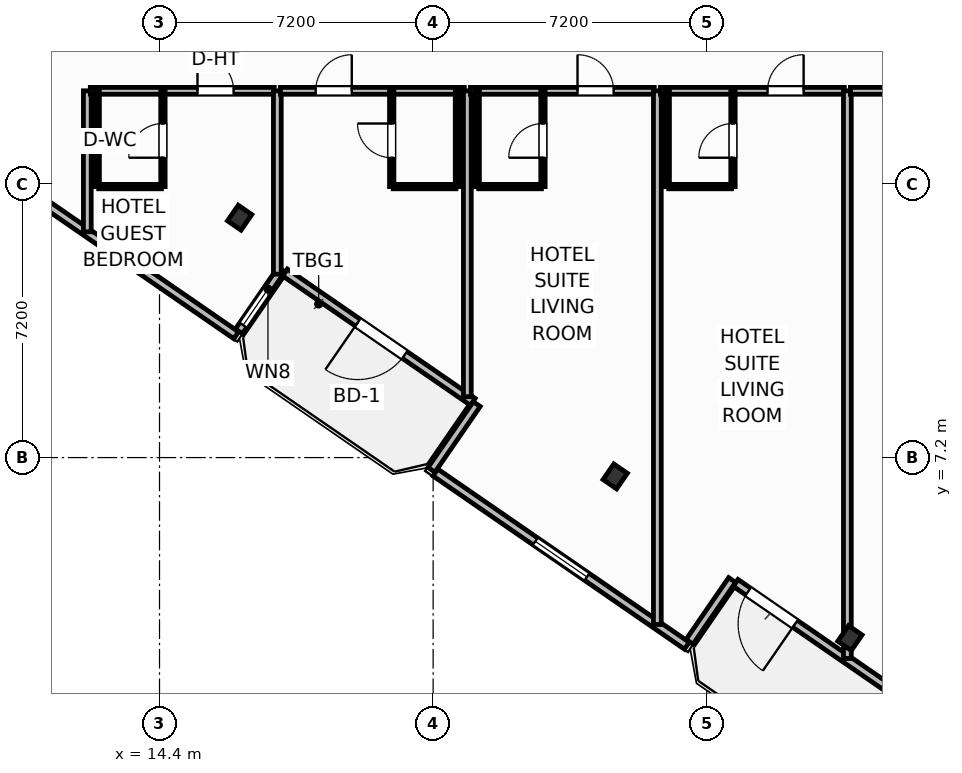
"""IFC4 building model, lengths in metres.
Left out: names, types, materials, properties, quantities, classifications, styles, units other than length and angle.
Written with IfcOpenShell. Run it as: python <this file> out.ifc"""

import sys

from ifc_helpers import new_model, si_unit, direction, frame, frame_2d, origin, origin_2d, place, context, subcontext, project, spatial, rectangle, i_section, extrude, element, fill, save


model = new_model("IFC4")
c1 = context("Model", 3, precision=1e-05, world=origin(), true_north=direction((0.0, 1.0)))
c2 = subcontext(c1, "Body", "Model", "MODEL_VIEW")
j1 = project(units=[si_unit("LENGTHUNIT", "METRE"), si_unit("PLANEANGLEUNIT", "RADIAN")], contexts=[c1])
p1 = place(None, origin())
s1 = spatial("IfcSite", under=j1, at=p1, CompositionType="ELEMENT")
p2 = place(p1, origin())
s2 = spatial("IfcBuilding", under=s1, at=p2, CompositionType="ELEMENT")
p3 = place(p2, frame((0.0, 0.0, 30.7)))
s3 = spatial("IfcBuildingStorey", under=s2, at=p3, CompositionType="ELEMENT", Elevation=30.7)
for number, where, z_axis, x_axis in (
    (1, (16.509, 13.512, 0.0), (0.0, 0.0, 1.0), (0.824, -0.567, 0.0)),
    (2, (26.391, 6.705, 0.0), (0.0, 0.0, 1.0), (0.824, -0.567, 0.0)),
    (3, (32.568, 2.45, 0.0), (0.0, 0.0, 1.0), (0.824, -0.567, 0.0)),
):
    element("IfcColumn", number, at=place(p3, frame(where, z_axis=z_axis, x_axis=x_axis)), inside=s3, PredefinedType="COLUMN", context=c2, shape_type="SweptSolid", body=[
        extrude(i_section(OverallWidth=0.432, OverallDepth=0.498, WebThickness=0.056, FlangeThickness=0.089, FilletRadius=0.025, at=origin_2d()), origin(), (0.0, 0.0, 1.0), 3.7),
    ])
p4 = place(p3, frame((22.643, 8.667, 0.0), z_axis=(0.0, 0.0, 1.0), x_axis=(-0.823534636215, 0.567265989598, 0.0)))
e4 = element("IfcWall", 4, at=p4, inside=s3, PredefinedType="SOLIDWALL", context=c2, shape_type="SweptSolid", body=[
    extrude(rectangle(XDim=6.0, YDim=0.22, at=frame_2d((3.0, 0.0))), origin(), (0.0, 0.0, 1.0), 2.73),
])
p5 = place(p4, frame((2.176, 0.0, 0.0)))
e5 = element("IfcOpeningElement", 5, at=p5, cuts=e4, PredefinedType="OPENING", context=c2, shape_type="SweptSolid", body=[
    extrude(rectangle(XDim=1.5, YDim=2.25, at=frame_2d((0.75, 1.125))), frame((0.0, 0.12, 0.0), z_axis=(0.0, -1.0, 0.0), x_axis=(1.0, 0.0, 0.0)), (0.0, 0.0, 1.0), 0.24),
])
p6 = place(p3, frame((34.502, 0.499, 0.0), z_axis=(0.0, 0.0, 1.0), x_axis=(-0.823534636215, 0.567265989598, 0.0)))
e6 = element("IfcWall", 6, at=p6, inside=s3, PredefinedType="SOLIDWALL", context=c2, shape_type="SweptSolid", body=[
    extrude(rectangle(XDim=6.0, YDim=0.22, at=frame_2d((3.0, 0.0))), origin(), (0.0, 0.0, 1.0), 2.73),
])
p7 = place(p6, frame((4.1, 0.0, 0.0)))
e7 = element("IfcOpeningElement", 7, at=p7, cuts=e6, PredefinedType="OPENING", context=c2, shape_type="SweptSolid", body=[
    extrude(rectangle(XDim=1.5, YDim=2.25, at=frame_2d((0.75, 1.125))), frame((0.0, 0.12, 0.0), z_axis=(0.0, -1.0, 0.0), x_axis=(1.0, 0.0, 0.0)), (0.0, 0.0, 1.0), 0.24),
])
p8 = place(p3, frame((-2.728, 23.605, 0.0), z_axis=(0.0, 0.0, 1.0), x_axis=(0.823535075462, -0.567265351915, 0.0)))
e8 = element("IfcWall", 8, at=p8, inside=s3, PredefinedType="SOLIDWALL", context=c2, shape_type="SweptSolid", body=[
    extrude(rectangle(XDim=23.247, YDim=0.22, at=frame_2d((11.624, 0.0))), origin(), (0.0, 0.0, 1.0), 2.73),
])
p9 = place(p8, frame((10.799, 0.0, 0.8)))
e9 = element("IfcOpeningElement", 9, at=p9, cuts=e8, PredefinedType="OPENING", context=c2, shape_type="SweptSolid", body=[
    extrude(rectangle(XDim=1.65, YDim=1.65, at=frame_2d((0.825, 0.825))), frame((0.0, 0.12, 0.0), z_axis=(0.0, -1.0, 0.0), x_axis=(1.0, 0.0, 0.0)), (0.0, 0.0, 1.0), 0.24),
])
p10 = place(p3, frame((16.488, 10.521, 0.0), z_axis=(0.0, 0.0, 1.0), x_axis=(0.567131976434, 0.823626930902, 0.0)))
e10 = element("IfcWall", 10, at=p10, inside=s3, PredefinedType="SOLIDWALL", context=c2, shape_type="SweptSolid", body=[
    extrude(rectangle(XDim=1.975, YDim=0.22, at=frame_2d((0.988, 0.0))), origin(), (0.0, 0.0, 1.0), 2.73),
])
p11 = place(p10, frame((0.2, 0.0, 0.8)))
e11 = element("IfcOpeningElement", 11, at=p11, cuts=e10, PredefinedType="OPENING", context=c2, shape_type="SweptSolid", body=[
    extrude(rectangle(XDim=1.15, YDim=1.4, at=frame_2d((0.575, 0.7))), frame((0.0, 0.12, 0.0), z_axis=(0.0, -1.0, 0.0), x_axis=(1.0, 0.0, 0.0)), (0.0, 0.0, 1.0), 0.24),
])
p12 = place(p3, frame((22.747, 8.607, 0.0), z_axis=(0.0, 0.0, 1.0), x_axis=(-0.567219383419, -0.823566737474, 0.0)))
e12 = element("IfcWall", 12, at=p12, inside=s3, PredefinedType="SOLIDWALL", context=c2, shape_type="SweptSolid", body=[
    extrude(rectangle(XDim=2.1, YDim=0.22, at=frame_2d((1.05, 0.0))), origin(), (0.0, 0.0, 1.0), 2.73),
])
p13 = place(p3, frame((21.659, 6.807, 0.0), z_axis=(0.0, 0.0, 1.0), x_axis=(0.823535360023, -0.567264938799, 0.0)))
e13 = element("IfcWall", 13, at=p13, inside=s3, PredefinedType="SOLIDWALL", context=c2, shape_type="SweptSolid", body=[
    extrude(rectangle(XDim=8.035, YDim=0.22, at=frame_2d((4.018, 0.0))), origin(), (0.0, 0.0, 1.0), 2.73),
])
p14 = place(p13, frame((3.192, 0.0, 0.8)))
e14 = element("IfcOpeningElement", 14, at=p14, cuts=e13, PredefinedType="OPENING", context=c2, shape_type="SweptSolid", body=[
    extrude(rectangle(XDim=1.65, YDim=1.65, at=frame_2d((0.825, 0.825))), frame((0.0, 0.12, 0.0), z_axis=(0.0, -1.0, 0.0), x_axis=(1.0, 0.0, 0.0)), (0.0, 0.0, 1.0), 0.24),
])
p15 = place(p3, frame((28.347, 2.352, 0.0), z_axis=(0.0, 0.0, 1.0), x_axis=(0.567215821234, 0.823569190865, 0.0)))
e15 = element("IfcWall", 15, at=p15, inside=s3, PredefinedType="SOLIDWALL", context=c2, shape_type="SweptSolid", body=[
    extrude(rectangle(XDim=1.975, YDim=0.22, at=frame_2d((0.988, 0.0))), origin(), (0.0, 0.0, 1.0), 2.73),
])
p16 = place(p3, frame((12.5, 13.14, 0.0), z_axis=(0.0, 0.0, 1.0), x_axis=(0.0, 1.0, 0.0)))
e16 = element("IfcWall", 16, at=p16, inside=s3, PredefinedType="PARTITIONING", context=c2, shape_type="SweptSolid", body=[
    extrude(rectangle(XDim=3.71, YDim=0.205, at=frame_2d((1.855, 0.0))), origin(), (0.0, 0.0, 1.0), 3.45),
])
p17 = place(p3, frame((12.58, 16.85, 0.0), z_axis=(0.0, 0.0, 1.0), x_axis=(1.0, 0.0, 0.0)))
e17 = element("IfcWall", 17, at=p17, inside=s3, PredefinedType="PARTITIONING", context=c2, shape_type="SweptSolid", body=[
    extrude(rectangle(XDim=4.84, YDim=0.18, at=frame_2d((2.42, 0.0))), origin(), (0.0, 0.0, 1.0), 3.45),
])
p18 = place(p17, frame((2.819, 0.0, 0.0)))
e18 = element("IfcOpeningElement", 18, at=p18, cuts=e17, PredefinedType="OPENING", context=c2, shape_type="SweptSolid", body=[
    extrude(rectangle(XDim=0.95, YDim=2.15, at=frame_2d((0.475, 1.075))), frame((0.0, 0.1, 0.0), z_axis=(0.0, -1.0, 0.0), x_axis=(1.0, 0.0, 0.0)), (0.0, 0.0, 1.0), 0.2),
])
p19 = place(p3, frame((12.8, 14.33, 0.0), z_axis=(0.0, 0.0, 1.0), x_axis=(1.0, 0.0, 0.0)))
e19 = element("IfcWall", 19, at=p19, inside=s3, PredefinedType="PARTITIONING", context=c2, shape_type="SweptSolid", body=[
    extrude(rectangle(XDim=1.65, YDim=0.115, at=frame_2d((0.825, 0.0))), origin(), (0.0, 0.0, 1.0), 3.45),
])
p20 = place(p3, frame((14.49, 14.33, 0.0), z_axis=(0.0, 0.0, 1.0), x_axis=(0.0, 1.0, 0.0)))
e20 = element("IfcWall", 20, at=p20, inside=s3, PredefinedType="PARTITIONING", context=c2, shape_type="SweptSolid", body=[
    extrude(rectangle(XDim=2.52, YDim=0.115, at=frame_2d((1.26, 0.0))), origin(), (0.0, 0.0, 1.0), 3.45),
])
p21 = place(p20, frame((0.76, 0.0, 0.0)))
e21 = element("IfcOpeningElement", 21, at=p21, cuts=e20, PredefinedType="OPENING", context=c2, shape_type="SweptSolid", body=[
    extrude(rectangle(XDim=0.9, YDim=2.05, at=frame_2d((0.45, 1.025))), frame((0.0, 0.067, 0.0), z_axis=(0.0, -1.0, 0.0), x_axis=(1.0, 0.0, 0.0)), (0.0, 0.0, 1.0), 0.135),
])
p22 = place(p3, frame((12.76, 14.33, 0.0), z_axis=(0.0, 0.0, 1.0), x_axis=(0.0, 1.0, 0.0)))
e22 = element("IfcWall", 22, at=p22, inside=s3, PredefinedType="PARTITIONING", context=c2, shape_type="SweptSolid", body=[
    extrude(rectangle(XDim=2.52, YDim=0.115, at=frame_2d((1.26, 0.0))), origin(), (0.0, 0.0, 1.0), 3.45),
])
p23 = place(p3, frame((17.5, 12.025, 0.0), z_axis=(0.0, 0.0, 1.0), x_axis=(0.0, 1.0, 0.0)))
e23 = element("IfcWall", 23, at=p23, inside=s3, PredefinedType="PARTITIONING", context=c2, shape_type="SweptSolid", body=[
    extrude(rectangle(XDim=4.825, YDim=0.205, at=frame_2d((2.413, 0.0))), origin(), (0.0, 0.0, 1.0), 3.45),
])
p24 = place(p3, frame((17.58, 16.85, 0.0), z_axis=(0.0, 0.0, 1.0), x_axis=(1.0, 0.0, 0.0)))
e24 = element("IfcWall", 24, at=p24, inside=s3, PredefinedType="PARTITIONING", context=c2, shape_type="SweptSolid", body=[
    extrude(rectangle(XDim=4.84, YDim=0.18, at=frame_2d((2.42, 0.0))), origin(), (0.0, 0.0, 1.0), 3.45),
])
p25 = place(p24, frame((0.929, 0.0, 0.0)))
e25 = element("IfcOpeningElement", 25, at=p25, cuts=e24, PredefinedType="OPENING", context=c2, shape_type="SweptSolid", body=[
    extrude(rectangle(XDim=0.95, YDim=2.15, at=frame_2d((0.475, 1.075))), frame((0.0, 0.1, 0.0), z_axis=(0.0, -1.0, 0.0), x_axis=(1.0, 0.0, 0.0)), (0.0, 0.0, 1.0), 0.2),
])
p26 = place(p3, frame((20.55, 14.33, 0.0), z_axis=(0.0, 0.0, 1.0), x_axis=(1.0, 0.0, 0.0)))
e26 = element("IfcWall", 26, at=p26, inside=s3, PredefinedType="PARTITIONING", context=c2, shape_type="SweptSolid", body=[
    extrude(rectangle(XDim=1.65, YDim=0.115, at=frame_2d((0.825, 0.0))), origin(), (0.0, 0.0, 1.0), 3.45),
])
p27 = place(p3, frame((20.51, 14.33, 0.0), z_axis=(0.0, 0.0, 1.0), x_axis=(0.0, 1.0, 0.0)))
e27 = element("IfcWall", 27, at=p27, inside=s3, PredefinedType="PARTITIONING", context=c2, shape_type="SweptSolid", body=[
    extrude(rectangle(XDim=2.52, YDim=0.115, at=frame_2d((1.26, 0.0))), origin(), (0.0, 0.0, 1.0), 3.45),
])
p28 = place(p27, frame((0.76, 0.0, 0.0)))
e28 = element("IfcOpeningElement", 28, at=p28, cuts=e27, PredefinedType="OPENING", context=c2, shape_type="SweptSolid", body=[
    extrude(rectangle(XDim=0.9, YDim=2.05, at=frame_2d((0.45, 1.025))), frame((0.0, 0.067, 0.0), z_axis=(0.0, -1.0, 0.0), x_axis=(1.0, 0.0, 0.0)), (0.0, 0.0, 1.0), 0.135),
])
p29 = place(p3, frame((22.24, 14.33, 0.0), z_axis=(0.0, 0.0, 1.0), x_axis=(0.0, 1.0, 0.0)))
e29 = element("IfcWall", 29, at=p29, inside=s3, PredefinedType="PARTITIONING", context=c2, shape_type="SweptSolid", body=[
    extrude(rectangle(XDim=2.52, YDim=0.115, at=frame_2d((1.26, 0.0))), origin(), (0.0, 0.0, 1.0), 3.45),
])
p30 = place(p3, frame((22.5, 8.802, 0.0), z_axis=(0.0, 0.0, 1.0), x_axis=(0.0, 1.0, 0.0)))
e30 = element("IfcWall", 30, at=p30, inside=s3, PredefinedType="PARTITIONING", context=c2, shape_type="SweptSolid", body=[
    extrude(rectangle(XDim=8.048, YDim=0.205, at=frame_2d((4.024, 0.0))), origin(), (0.0, 0.0, 1.0), 3.45),
])
p31 = place(p3, frame((22.58, 16.85, 0.0), z_axis=(0.0, 0.0, 1.0), x_axis=(1.0, 0.0, 0.0)))
e31 = element("IfcWall", 31, at=p31, inside=s3, PredefinedType="PARTITIONING", context=c2, shape_type="SweptSolid", body=[
    extrude(rectangle(XDim=4.84, YDim=0.18, at=frame_2d((2.42, 0.0))), origin(), (0.0, 0.0, 1.0), 3.45),
])
p32 = place(p31, frame((2.819, 0.0, 0.0)))
e32 = element("IfcOpeningElement", 32, at=p32, cuts=e31, PredefinedType="OPENING", context=c2, shape_type="SweptSolid", body=[
    extrude(rectangle(XDim=0.95, YDim=2.15, at=frame_2d((0.475, 1.075))), frame((0.0, 0.1, 0.0), z_axis=(0.0, -1.0, 0.0), x_axis=(1.0, 0.0, 0.0)), (0.0, 0.0, 1.0), 0.2),
])
p33 = place(p3, frame((22.8, 14.33, 0.0), z_axis=(0.0, 0.0, 1.0), x_axis=(1.0, 0.0, 0.0)))
e33 = element("IfcWall", 33, at=p33, inside=s3, PredefinedType="PARTITIONING", context=c2, shape_type="SweptSolid", body=[
    extrude(rectangle(XDim=1.65, YDim=0.115, at=frame_2d((0.825, 0.0))), origin(), (0.0, 0.0, 1.0), 3.45),
])
p34 = place(p3, frame((24.49, 14.33, 0.0), z_axis=(0.0, 0.0, 1.0), x_axis=(0.0, 1.0, 0.0)))
e34 = element("IfcWall", 34, at=p34, inside=s3, PredefinedType="PARTITIONING", context=c2, shape_type="SweptSolid", body=[
    extrude(rectangle(XDim=2.52, YDim=0.115, at=frame_2d((1.26, 0.0))), origin(), (0.0, 0.0, 1.0), 3.45),
])
p35 = place(p34, frame((0.76, 0.0, 0.0)))
e35 = element("IfcOpeningElement", 35, at=p35, cuts=e34, PredefinedType="OPENING", context=c2, shape_type="SweptSolid", body=[
    extrude(rectangle(XDim=0.9, YDim=2.05, at=frame_2d((0.45, 1.025))), frame((0.0, 0.067, 0.0), z_axis=(0.0, -1.0, 0.0), x_axis=(1.0, 0.0, 0.0)), (0.0, 0.0, 1.0), 0.135),
])
p36 = place(p3, frame((22.76, 14.33, 0.0), z_axis=(0.0, 0.0, 1.0), x_axis=(0.0, 1.0, 0.0)))
e36 = element("IfcWall", 36, at=p36, inside=s3, PredefinedType="PARTITIONING", context=c2, shape_type="SweptSolid", body=[
    extrude(rectangle(XDim=2.52, YDim=0.115, at=frame_2d((1.26, 0.0))), origin(), (0.0, 0.0, 1.0), 3.45),
])
p37 = place(p3, frame((27.5, 2.808, 0.0), z_axis=(0.0, 0.0, 1.0), x_axis=(0.0, 1.0, 0.0)))
e37 = element("IfcWall", 37, at=p37, inside=s3, PredefinedType="PARTITIONING", context=c2, shape_type="SweptSolid", body=[
    extrude(rectangle(XDim=14.042, YDim=0.205, at=frame_2d((7.021, 0.0))), origin(), (0.0, 0.0, 1.0), 3.45),
])
p38 = place(p3, frame((27.58, 16.85, 0.0), z_axis=(0.0, 0.0, 1.0), x_axis=(1.0, 0.0, 0.0)))
e38 = element("IfcWall", 38, at=p38, inside=s3, PredefinedType="PARTITIONING", context=c2, shape_type="SweptSolid", body=[
    extrude(rectangle(XDim=4.84, YDim=0.18, at=frame_2d((2.42, 0.0))), origin(), (0.0, 0.0, 1.0), 3.45),
])
p39 = place(p38, frame((2.819, 0.0, 0.0)))
e39 = element("IfcOpeningElement", 39, at=p39, cuts=e38, PredefinedType="OPENING", context=c2, shape_type="SweptSolid", body=[
    extrude(rectangle(XDim=0.95, YDim=2.15, at=frame_2d((0.475, 1.075))), frame((0.0, 0.1, 0.0), z_axis=(0.0, -1.0, 0.0), x_axis=(1.0, 0.0, 0.0)), (0.0, 0.0, 1.0), 0.2),
])
p40 = place(p3, frame((27.8, 14.33, 0.0), z_axis=(0.0, 0.0, 1.0), x_axis=(1.0, 0.0, 0.0)))
e40 = element("IfcWall", 40, at=p40, inside=s3, PredefinedType="PARTITIONING", context=c2, shape_type="SweptSolid", body=[
    extrude(rectangle(XDim=1.65, YDim=0.115, at=frame_2d((0.825, 0.0))), origin(), (0.0, 0.0, 1.0), 3.45),
])
p41 = place(p3, frame((29.49, 14.33, 0.0), z_axis=(0.0, 0.0, 1.0), x_axis=(0.0, 1.0, 0.0)))
e41 = element("IfcWall", 41, at=p41, inside=s3, PredefinedType="PARTITIONING", context=c2, shape_type="SweptSolid", body=[
    extrude(rectangle(XDim=2.52, YDim=0.115, at=frame_2d((1.26, 0.0))), origin(), (0.0, 0.0, 1.0), 3.45),
])
p42 = place(p41, frame((0.76, 0.0, 0.0)))
e42 = element("IfcOpeningElement", 42, at=p42, cuts=e41, PredefinedType="OPENING", context=c2, shape_type="SweptSolid", body=[
    extrude(rectangle(XDim=0.9, YDim=2.05, at=frame_2d((0.45, 1.025))), frame((0.0, 0.067, 0.0), z_axis=(0.0, -1.0, 0.0), x_axis=(1.0, 0.0, 0.0)), (0.0, 0.0, 1.0), 0.135),
])
p43 = place(p3, frame((27.76, 14.33, 0.0), z_axis=(0.0, 0.0, 1.0), x_axis=(0.0, 1.0, 0.0)))
e43 = element("IfcWall", 43, at=p43, inside=s3, PredefinedType="PARTITIONING", context=c2, shape_type="SweptSolid", body=[
    extrude(rectangle(XDim=2.52, YDim=0.115, at=frame_2d((1.26, 0.0))), origin(), (0.0, 0.0, 1.0), 3.45),
])
p44 = place(p3, frame((32.5, 1.914, 0.0), z_axis=(0.0, 0.0, 1.0), x_axis=(0.0, 1.0, 0.0)))
e44 = element("IfcWall", 44, at=p44, inside=s3, PredefinedType="PARTITIONING", context=c2, shape_type="SweptSolid", body=[
    extrude(rectangle(XDim=14.936, YDim=0.205, at=frame_2d((7.468, 0.0))), origin(), (0.0, 0.0, 1.0), 2.58),
])
p45 = place(p3, frame((32.58, 16.85, 0.0), z_axis=(0.0, 0.0, 1.0), x_axis=(1.0, 0.0, 0.0)))
e45 = element("IfcWall", 45, at=p45, inside=s3, PredefinedType="PARTITIONING", context=c2, shape_type="SweptSolid", body=[
    extrude(rectangle(XDim=4.84, YDim=0.18, at=frame_2d((2.42, 0.0))), origin(), (0.0, 0.0, 1.0), 3.45),
])
p46 = place(p45, frame((0.929, 0.0, 0.0)))
e46 = element("IfcOpeningElement", 46, at=p46, cuts=e45, PredefinedType="OPENING", context=c2, shape_type="SweptSolid", body=[
    extrude(rectangle(XDim=0.95, YDim=2.15, at=frame_2d((0.475, 1.075))), frame((0.0, 0.1, 0.0), z_axis=(0.0, -1.0, 0.0), x_axis=(1.0, 0.0, 0.0)), (0.0, 0.0, 1.0), 0.2),
])
p47 = place(p5, origin())
e47 = element("IfcDoor", 47, at=p47, inside=s3, OperationType="SINGLE_SWING_RIGHT", PredefinedType="DOOR", context=c2, shape_type="SweptSolid", body=[
    extrude(rectangle(XDim=1.5, YDim=2.25, at=frame_2d((0.75, 1.125))), frame((0.0, 0.025, 0.0), z_axis=(0.0, -1.0, 0.0), x_axis=(1.0, 0.0, 0.0)), (0.0, 0.0, 1.0), 0.05),
])
fill(e5, e47)
p48 = place(p7, origin())
e48 = element("IfcDoor", 48, at=p48, inside=s3, OperationType="SINGLE_SWING_LEFT", PredefinedType="DOOR", context=c2, shape_type="SweptSolid", body=[
    extrude(rectangle(XDim=1.5, YDim=2.25, at=frame_2d((0.75, 1.125))), frame((0.0, 0.025, 0.0), z_axis=(0.0, -1.0, 0.0), x_axis=(1.0, 0.0, 0.0)), (0.0, 0.0, 1.0), 0.05),
])
fill(e7, e48)
p49 = place(p14, origin())
e49 = element("IfcWindow", 49, at=p49, inside=s3, PartitioningType="SINGLE_PANEL", PredefinedType="WINDOW", context=c2, shape_type="SweptSolid", body=[
    extrude(rectangle(XDim=1.65, YDim=1.65, at=frame_2d((0.825, 0.825))), frame((0.0, 0.03, 0.0), z_axis=(0.0, -1.0, 0.0), x_axis=(1.0, 0.0, 0.0)), (0.0, 0.0, 1.0), 0.06),
])
fill(e14, e49)
p50 = place(p18, origin())
e50 = element("IfcDoor", 50, at=p50, inside=s3, OperationType="SINGLE_SWING_LEFT", PredefinedType="DOOR", context=c2, shape_type="SweptSolid", body=[
    extrude(rectangle(XDim=0.95, YDim=2.15, at=frame_2d((0.475, 1.075))), frame((0.0, 0.025, 0.0), z_axis=(0.0, -1.0, 0.0), x_axis=(1.0, 0.0, 0.0)), (0.0, 0.0, 1.0), 0.05),
])
fill(e18, e50)
p51 = place(p21, origin())
e51 = element("IfcDoor", 51, at=p51, inside=s3, OperationType="SINGLE_SWING_LEFT", PredefinedType="DOOR", context=c2, shape_type="SweptSolid", body=[
    extrude(rectangle(XDim=0.9, YDim=2.05, at=frame_2d((0.45, 1.025))), frame((0.0, 0.025, 0.0), z_axis=(0.0, -1.0, 0.0), x_axis=(1.0, 0.0, 0.0)), (0.0, 0.0, 1.0), 0.05),
])
fill(e21, e51)
p52 = place(p25, origin())
e52 = element("IfcDoor", 52, at=p52, inside=s3, OperationType="SINGLE_SWING_RIGHT", PredefinedType="DOOR", context=c2, shape_type="SweptSolid", body=[
    extrude(rectangle(XDim=0.95, YDim=2.15, at=frame_2d((0.475, 1.075))), frame((0.0, 0.025, 0.0), z_axis=(0.0, -1.0, 0.0), x_axis=(1.0, 0.0, 0.0)), (0.0, 0.0, 1.0), 0.05),
])
fill(e25, e52)
p53 = place(p28, origin())
e53 = element("IfcDoor", 53, at=p53, inside=s3, OperationType="SINGLE_SWING_RIGHT", PredefinedType="DOOR", context=c2, shape_type="SweptSolid", body=[
    extrude(rectangle(XDim=0.9, YDim=2.05, at=frame_2d((0.45, 1.025))), frame((0.0, 0.025, 0.0), z_axis=(0.0, -1.0, 0.0), x_axis=(1.0, 0.0, 0.0)), (0.0, 0.0, 1.0), 0.05),
])
fill(e28, e53)
p54 = place(p32, origin())
e54 = element("IfcDoor", 54, at=p54, inside=s3, OperationType="SINGLE_SWING_LEFT", PredefinedType="DOOR", context=c2, shape_type="SweptSolid", body=[
    extrude(rectangle(XDim=0.95, YDim=2.15, at=frame_2d((0.475, 1.075))), frame((0.0, 0.025, 0.0), z_axis=(0.0, -1.0, 0.0), x_axis=(1.0, 0.0, 0.0)), (0.0, 0.0, 1.0), 0.05),
])
fill(e32, e54)
p55 = place(p35, origin())
e55 = element("IfcDoor", 55, at=p55, inside=s3, OperationType="SINGLE_SWING_LEFT", PredefinedType="DOOR", context=c2, shape_type="SweptSolid", body=[
    extrude(rectangle(XDim=0.9, YDim=2.05, at=frame_2d((0.45, 1.025))), frame((0.0, 0.025, 0.0), z_axis=(0.0, -1.0, 0.0), x_axis=(1.0, 0.0, 0.0)), (0.0, 0.0, 1.0), 0.05),
])
fill(e35, e55)
p56 = place(p39, origin())
e56 = element("IfcDoor", 56, at=p56, inside=s3, OperationType="SINGLE_SWING_RIGHT", PredefinedType="DOOR", context=c2, shape_type="SweptSolid", body=[
    extrude(rectangle(XDim=0.95, YDim=2.15, at=frame_2d((0.475, 1.075))), frame((0.0, 0.025, 0.0), z_axis=(0.0, -1.0, 0.0), x_axis=(1.0, 0.0, 0.0)), (0.0, 0.0, 1.0), 0.05),
])
fill(e39, e56)
p57 = place(p42, origin())
e57 = element("IfcDoor", 57, at=p57, inside=s3, OperationType="SINGLE_SWING_LEFT", PredefinedType="DOOR", context=c2, shape_type="SweptSolid", body=[
    extrude(rectangle(XDim=0.9, YDim=2.05, at=frame_2d((0.45, 1.025))), frame((0.0, 0.025, 0.0), z_axis=(0.0, -1.0, 0.0), x_axis=(1.0, 0.0, 0.0)), (0.0, 0.0, 1.0), 0.05),
])
fill(e42, e57)
p58 = place(p11, origin())
e58 = element("IfcWindow", 58, at=p58, inside=s3, PartitioningType="SINGLE_PANEL", PredefinedType="WINDOW", context=c2, shape_type="SweptSolid", body=[
    extrude(rectangle(XDim=1.15, YDim=1.4, at=frame_2d((0.575, 0.7))), frame((0.0, 0.03, 0.0), z_axis=(0.0, -1.0, 0.0), x_axis=(1.0, 0.0, 0.0)), (0.0, 0.0, 1.0), 0.06),
])
fill(e11, e58)
save(model, sys.argv[1])
